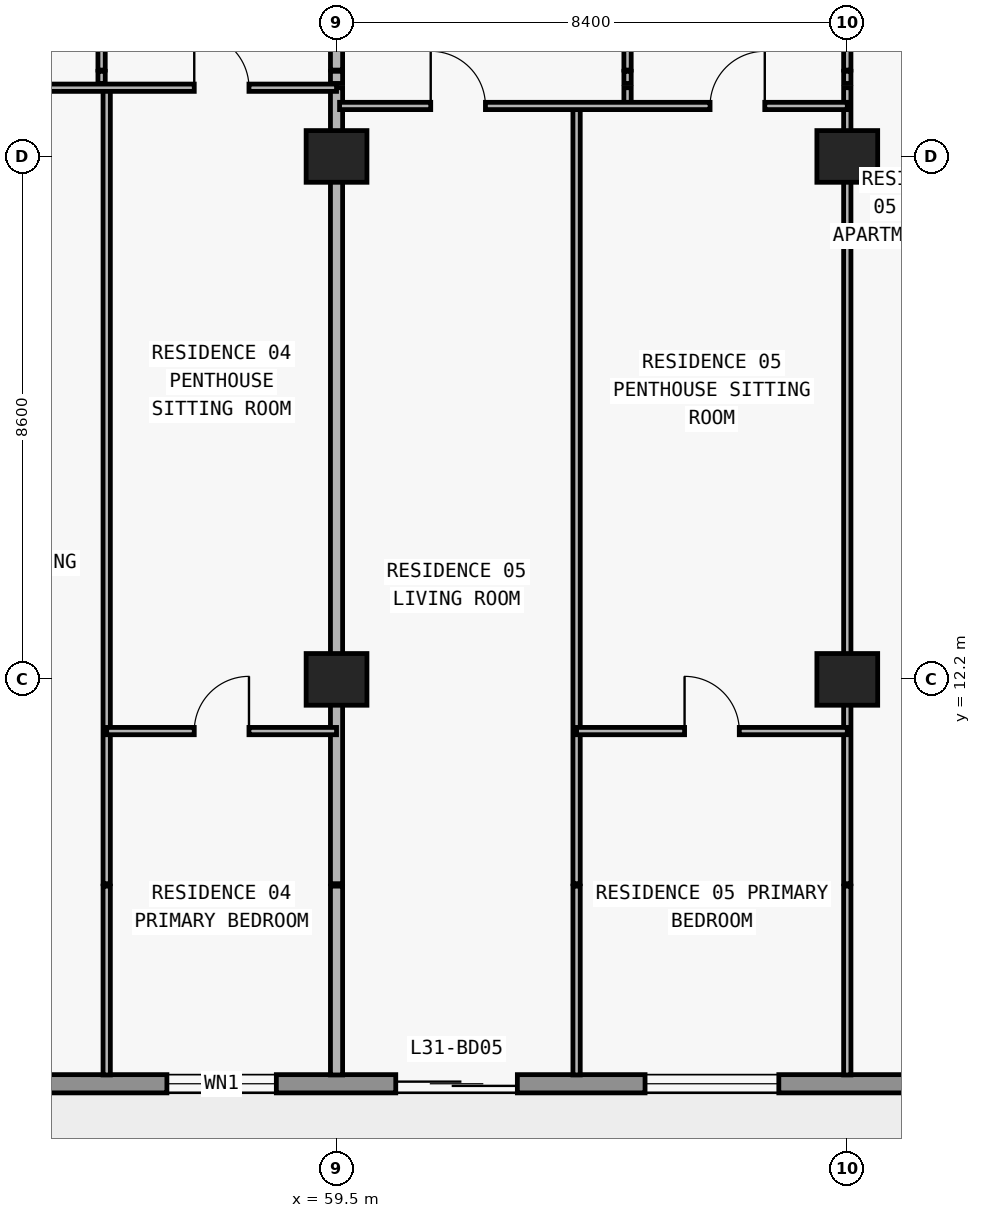
"""IFC4 building model, lengths in metres.
Left out: names, types, materials, properties, quantities, classifications, styles, units other than length and angle.
Written with IfcOpenShell. Run it as: python <this file> out.ifc"""

import sys

from ifc_helpers import new_model, si_unit, direction, frame, frame_2d, origin, origin_2d, place, context, subcontext, project, spatial, rectangle, extrude, element, fill, save


model = new_model("IFC4")
c1 = context("Model", 3, precision=1e-05, world=origin(), true_north=direction((0.0, 1.0)))
c2 = subcontext(c1, "Body", "Model", "MODEL_VIEW")
j1 = project(units=[si_unit("LENGTHUNIT", "METRE"), si_unit("PLANEANGLEUNIT", "RADIAN")], contexts=[c1])
p1 = place(None, origin())
s1 = spatial("IfcSite", under=j1, at=p1, CompositionType="ELEMENT")
p2 = place(p1, origin())
s2 = spatial("IfcBuilding", under=s1, at=p2, CompositionType="ELEMENT")
p3 = place(p2, frame((0.0, 0.0, 115.8)))
s3 = spatial("IfcBuildingStorey", under=s2, at=p3, CompositionType="ELEMENT", Elevation=115.8)
for number, where, z_axis, x_axis in (
    (1, (59.5, 12.2, 0.0), (0.0, 0.0, 1.0), (1.0, 0.0, 0.0)),
    (2, (67.9, 12.2, 0.0), (0.0, 0.0, 1.0), (1.0, 0.0, 0.0)),
    (3, (59.5, 20.8, 0.0), (0.0, 0.0, 1.0), (1.0, 0.0, 0.0)),
    (4, (67.9, 20.8, 0.0), (0.0, 0.0, 1.0), (1.0, 0.0, 0.0)),
):
    element("IfcColumn", number, at=place(p3, frame(where, z_axis=z_axis, x_axis=x_axis)), inside=s3, PredefinedType="COLUMN", context=c2, shape_type="SweptSolid", body=[
        extrude(rectangle(XDim=1.0, YDim=0.85, at=origin_2d()), origin(), (0.0, 0.0, 1.0), 3.05),
    ])
p4 = place(p3, frame((70.1, 5.55, 0.0), z_axis=(0.0, 0.0, 1.0), x_axis=(-1.0, 0.0, 0.0)))
e5 = element("IfcWall", 5, at=p4, inside=s3, PredefinedType="STANDARD", context=c2, shape_type="SweptSolid", body=[
    extrude(rectangle(XDim=62.4, YDim=0.3, at=frame_2d((31.2, 0.0))), origin(), (0.0, 0.0, 1.0), 3.05),
])
p5 = place(p4, frame((57.29, 0.0, 0.0)))
e6 = element("IfcOpeningElement", 6, at=p5, cuts=e5, PredefinedType="OPENING", context=c2, shape_type="SweptSolid", body=[
    extrude(rectangle(XDim=2.0, YDim=2.3, at=frame_2d((1.0, 1.15))), frame((0.0, 0.16, 0.0), z_axis=(0.0, -1.0, 0.0), x_axis=(1.0, 0.0, 0.0)), (0.0, 0.0, 1.0), 0.32),
])
p6 = place(p4, frame((52.61, 0.0, 0.65)))
e7 = element("IfcOpeningElement", 7, at=p6, cuts=e5, PredefinedType="OPENING", context=c2, shape_type="SweptSolid", body=[
    extrude(rectangle(XDim=2.6, YDim=1.85, at=frame_2d((1.3, 0.925))), frame((0.0, 0.16, 0.0), z_axis=(0.0, -1.0, 0.0), x_axis=(1.0, 0.0, 0.0)), (0.0, 0.0, 1.0), 0.32),
])
p7 = place(p4, frame((46.5, 0.0, 0.85)))
e8 = element("IfcOpeningElement", 8, at=p7, cuts=e5, PredefinedType="OPENING", context=c2, shape_type="SweptSolid", body=[
    extrude(rectangle(XDim=2.2, YDim=1.55, at=frame_2d((1.1, 0.775))), frame((0.0, 0.16, 0.0), z_axis=(0.0, -1.0, 0.0), x_axis=(1.0, 0.0, 0.0)), (0.0, 0.0, 1.0), 0.32),
])
p8 = place(p4, frame((40.49, 0.0, 0.0)))
e9 = element("IfcOpeningElement", 9, at=p8, cuts=e5, PredefinedType="OPENING", context=c2, shape_type="SweptSolid", body=[
    extrude(rectangle(XDim=2.0, YDim=2.3, at=frame_2d((1.0, 1.15))), frame((0.0, 0.16, 0.0), z_axis=(0.0, -1.0, 0.0), x_axis=(1.0, 0.0, 0.0)), (0.0, 0.0, 1.0), 0.32),
])
p9 = place(p4, frame((35.81, 0.0, 0.65)))
e10 = element("IfcOpeningElement", 10, at=p9, cuts=e5, PredefinedType="OPENING", context=c2, shape_type="SweptSolid", body=[
    extrude(rectangle(XDim=2.6, YDim=1.85, at=frame_2d((1.3, 0.925))), frame((0.0, 0.16, 0.0), z_axis=(0.0, -1.0, 0.0), x_axis=(1.0, 0.0, 0.0)), (0.0, 0.0, 1.0), 0.32),
])
p10 = place(p4, frame((30.1, 0.0, 0.85)))
e11 = element("IfcOpeningElement", 11, at=p10, cuts=e5, PredefinedType="OPENING", context=c2, shape_type="SweptSolid", body=[
    extrude(rectangle(XDim=2.2, YDim=1.55, at=frame_2d((1.1, 0.775))), frame((0.0, 0.16, 0.0), z_axis=(0.0, -1.0, 0.0), x_axis=(1.0, 0.0, 0.0)), (0.0, 0.0, 1.0), 0.32),
])
p11 = place(p4, frame((24.426, 0.0, 0.0)))
e12 = element("IfcOpeningElement", 12, at=p11, cuts=e5, PredefinedType="OPENING", context=c2, shape_type="SweptSolid", body=[
    extrude(rectangle(XDim=2.0, YDim=2.3, at=frame_2d((1.0, 1.15))), frame((0.0, 0.16, 0.0), z_axis=(0.0, -1.0, 0.0), x_axis=(1.0, 0.0, 0.0)), (0.0, 0.0, 1.0), 0.32),
])
p12 = place(p4, frame((20.126, 0.0, 0.85)))
e13 = element("IfcOpeningElement", 13, at=p12, cuts=e5, PredefinedType="OPENING", context=c2, shape_type="SweptSolid", body=[
    extrude(rectangle(XDim=2.2, YDim=1.55, at=frame_2d((1.1, 0.775))), frame((0.0, 0.16, 0.0), z_axis=(0.0, -1.0, 0.0), x_axis=(1.0, 0.0, 0.0)), (0.0, 0.0, 1.0), 0.32),
])
p13 = place(p4, frame((15.69, 0.0, 0.0)))
e14 = element("IfcOpeningElement", 14, at=p13, cuts=e5, PredefinedType="OPENING", context=c2, shape_type="SweptSolid", body=[
    extrude(rectangle(XDim=2.0, YDim=2.3, at=frame_2d((1.0, 1.15))), frame((0.0, 0.16, 0.0), z_axis=(0.0, -1.0, 0.0), x_axis=(1.0, 0.0, 0.0)), (0.0, 0.0, 1.0), 0.32),
])
p14 = place(p4, frame((11.59, 0.0, 0.85)))
e15 = element("IfcOpeningElement", 15, at=p14, cuts=e5, PredefinedType="OPENING", context=c2, shape_type="SweptSolid", body=[
    extrude(rectangle(XDim=1.8, YDim=1.55, at=frame_2d((0.9, 0.775))), frame((0.0, 0.16, 0.0), z_axis=(0.0, -1.0, 0.0), x_axis=(1.0, 0.0, 0.0)), (0.0, 0.0, 1.0), 0.32),
])
p15 = place(p4, frame((7.626, 0.0, 0.0)))
e16 = element("IfcOpeningElement", 16, at=p15, cuts=e5, PredefinedType="OPENING", context=c2, shape_type="SweptSolid", body=[
    extrude(rectangle(XDim=2.0, YDim=2.3, at=frame_2d((1.0, 1.15))), frame((0.0, 0.16, 0.0), z_axis=(0.0, -1.0, 0.0), x_axis=(1.0, 0.0, 0.0)), (0.0, 0.0, 1.0), 0.32),
])
p16 = place(p4, frame((3.326, 0.0, 0.85)))
e17 = element("IfcOpeningElement", 17, at=p16, cuts=e5, PredefinedType="OPENING", context=c2, shape_type="SweptSolid", body=[
    extrude(rectangle(XDim=2.2, YDim=1.55, at=frame_2d((1.1, 0.775))), frame((0.0, 0.16, 0.0), z_axis=(0.0, -1.0, 0.0), x_axis=(1.0, 0.0, 0.0)), (0.0, 0.0, 1.0), 0.32),
])
p17 = place(p3, frame((55.636, 22.0, 0.0), z_axis=(0.0, 0.0, 1.0), x_axis=(0.0, 1.0, 0.0)))
e18 = element("IfcWall", 18, at=p17, inside=s3, PredefinedType="PARTITIONING", context=c2, shape_type="SweptSolid", body=[
    extrude(rectangle(XDim=0.2, YDim=0.12, at=frame_2d((0.1, 0.0))), origin(), (0.0, 0.0, 1.0), 3.05),
])
p18 = place(p3, frame((55.636, 22.22, 0.0), z_axis=(0.0, 0.0, 1.0), x_axis=(0.0, 1.0, 0.0)))
e19 = element("IfcWall", 19, at=p18, inside=s3, PredefinedType="PARTITIONING", context=c2, shape_type="SweptSolid", body=[
    extrude(rectangle(XDim=4.38, YDim=0.12, at=frame_2d((2.19, 0.0))), origin(), (0.0, 0.0, 1.0), 3.05),
])
p19 = place(p18, frame((1.74, 0.0, 0.0)))
e20 = element("IfcOpeningElement", 20, at=p19, cuts=e19, PredefinedType="OPENING", context=c2, shape_type="SweptSolid", body=[
    extrude(rectangle(XDim=0.9, YDim=2.15, at=frame_2d((0.45, 1.075))), frame((0.0, 0.07, 0.0), z_axis=(0.0, -1.0, 0.0), x_axis=(1.0, 0.0, 0.0)), (0.0, 0.0, 1.0), 0.14),
])
p20 = place(p3, frame((55.72, 5.695, 0.0), z_axis=(0.0, 0.0, 1.0), x_axis=(0.0, 1.0, 0.0)))
e21 = element("IfcWall", 21, at=p20, inside=s3, PredefinedType="PARTITIONING", context=c2, shape_type="SweptSolid", body=[
    extrude(rectangle(XDim=3.105, YDim=0.12, at=frame_2d((1.552, 0.0))), origin(), (0.0, 0.0, 1.0), 3.05),
])
p21 = place(p3, frame((55.72, 8.84, 0.0), z_axis=(0.0, 0.0, 1.0), x_axis=(0.0, 1.0, 0.0)))
e22 = element("IfcWall", 22, at=p21, inside=s3, PredefinedType="PARTITIONING", context=c2, shape_type="SweptSolid", body=[
    extrude(rectangle(XDim=13.09, YDim=0.12, at=frame_2d((6.545, 0.0))), origin(), (0.0, 0.0, 1.0), 3.05),
])
p22 = place(p3, frame((59.5, 5.695, 0.0), z_axis=(0.0, 0.0, 1.0), x_axis=(0.0, 1.0, 0.0)))
e23 = element("IfcWall", 23, at=p22, inside=s3, PredefinedType="PARTITIONING", context=c2, shape_type="SweptSolid", body=[
    extrude(rectangle(XDim=3.105, YDim=0.2, at=frame_2d((1.552, 0.0))), origin(), (0.0, 0.0, 1.0), 3.05),
])
p23 = place(p3, frame((59.5, 8.84, 0.0), z_axis=(0.0, 0.0, 1.0), x_axis=(0.0, 1.0, 0.0)))
e24 = element("IfcWall", 24, at=p23, inside=s3, PredefinedType="PARTITIONING", context=c2, shape_type="SweptSolid", body=[
    extrude(rectangle(XDim=13.09, YDim=0.2, at=frame_2d((6.545, 0.0))), origin(), (0.0, 0.0, 1.0), 2.174),
])
p24 = place(p3, frame((59.5, 22.0, 0.0), z_axis=(0.0, 0.0, 1.0), x_axis=(0.0, 1.0, 0.0)))
e25 = element("IfcWall", 25, at=p24, inside=s3, PredefinedType="PARTITIONING", context=c2, shape_type="SweptSolid", body=[
    extrude(rectangle(XDim=0.2, YDim=0.2, at=frame_2d((0.1, 0.0))), origin(), (0.0, 0.0, 1.0), 2.174),
])
p25 = place(p3, frame((59.5, 22.22, 0.0), z_axis=(0.0, 0.0, 1.0), x_axis=(0.0, 1.0, 0.0)))
e26 = element("IfcWall", 26, at=p25, inside=s3, PredefinedType="PARTITIONING", context=c2, shape_type="SweptSolid", body=[
    extrude(rectangle(XDim=4.38, YDim=0.2, at=frame_2d((2.19, 0.0))), origin(), (0.0, 0.0, 1.0), 2.174),
])
p26 = place(p3, frame((63.448, 5.695, 0.0), z_axis=(0.0, 0.0, 1.0), x_axis=(0.0, 1.0, 0.0)))
e27 = element("IfcWall", 27, at=p26, inside=s3, PredefinedType="PARTITIONING", context=c2, shape_type="SweptSolid", body=[
    extrude(rectangle(XDim=3.105, YDim=0.12, at=frame_2d((1.552, 0.0))), origin(), (0.0, 0.0, 1.0), 3.05),
])
p27 = place(p3, frame((63.448, 8.84, 0.0), z_axis=(0.0, 0.0, 1.0), x_axis=(0.0, 1.0, 0.0)))
e28 = element("IfcWall", 28, at=p27, inside=s3, PredefinedType="PARTITIONING", context=c2, shape_type="SweptSolid", body=[
    extrude(rectangle(XDim=12.79, YDim=0.12, at=frame_2d((6.395, 0.0))), origin(), (0.0, 0.0, 1.0), 3.05),
])
p28 = place(p3, frame((64.286, 21.63, 0.0), z_axis=(0.0, 0.0, 1.0), x_axis=(0.0, 1.0, 0.0)))
e29 = element("IfcWall", 29, at=p28, inside=s3, PredefinedType="PARTITIONING", context=c2, shape_type="SweptSolid", body=[
    extrude(rectangle(XDim=0.3, YDim=0.12, at=frame_2d((0.15, 0.0))), origin(), (0.0, 0.0, 1.0), 3.05),
])
p29 = place(p3, frame((64.286, 22.0, 0.0), z_axis=(0.0, 0.0, 1.0), x_axis=(0.0, 1.0, 0.0)))
e30 = element("IfcWall", 30, at=p29, inside=s3, PredefinedType="PARTITIONING", context=c2, shape_type="SweptSolid", body=[
    extrude(rectangle(XDim=0.2, YDim=0.12, at=frame_2d((0.1, 0.0))), origin(), (0.0, 0.0, 1.0), 3.05),
])
p30 = place(p3, frame((64.286, 22.22, 0.0), z_axis=(0.0, 0.0, 1.0), x_axis=(0.0, 1.0, 0.0)))
e31 = element("IfcWall", 31, at=p30, inside=s3, PredefinedType="PARTITIONING", context=c2, shape_type="SweptSolid", body=[
    extrude(rectangle(XDim=4.38, YDim=0.12, at=frame_2d((2.19, 0.0))), origin(), (0.0, 0.0, 1.0), 3.05),
])
p31 = place(p30, frame((1.74, 0.0, 0.0)))
e32 = element("IfcOpeningElement", 32, at=p31, cuts=e31, PredefinedType="OPENING", context=c2, shape_type="SweptSolid", body=[
    extrude(rectangle(XDim=0.9, YDim=2.15, at=frame_2d((0.45, 1.075))), frame((0.0, 0.07, 0.0), z_axis=(0.0, -1.0, 0.0), x_axis=(1.0, 0.0, 0.0)), (0.0, 0.0, 1.0), 0.14),
])
p32 = place(p3, frame((67.9, 5.695, 0.0), z_axis=(0.0, 0.0, 1.0), x_axis=(0.0, 1.0, 0.0)))
e33 = element("IfcWall", 33, at=p32, inside=s3, PredefinedType="PARTITIONING", context=c2, shape_type="SweptSolid", body=[
    extrude(rectangle(XDim=3.105, YDim=0.12, at=frame_2d((1.552, 0.0))), origin(), (0.0, 0.0, 1.0), 3.05),
])
p33 = place(p3, frame((67.9, 8.84, 0.0), z_axis=(0.0, 0.0, 1.0), x_axis=(0.0, 1.0, 0.0)))
e34 = element("IfcWall", 34, at=p33, inside=s3, PredefinedType="PARTITIONING", context=c2, shape_type="SweptSolid", body=[
    extrude(rectangle(XDim=13.09, YDim=0.12, at=frame_2d((6.545, 0.0))), origin(), (0.0, 0.0, 1.0), 2.174),
])
p34 = place(p3, frame((67.9, 22.0, 0.0), z_axis=(0.0, 0.0, 1.0), x_axis=(0.0, 1.0, 0.0)))
e35 = element("IfcWall", 35, at=p34, inside=s3, PredefinedType="PARTITIONING", context=c2, shape_type="SweptSolid", body=[
    extrude(rectangle(XDim=0.2, YDim=0.12, at=frame_2d((0.1, 0.0))), origin(), (0.0, 0.0, 1.0), 2.174),
])
p35 = place(p3, frame((67.9, 22.22, 0.0), z_axis=(0.0, 0.0, 1.0), x_axis=(0.0, 1.0, 0.0)))
e36 = element("IfcWall", 36, at=p35, inside=s3, PredefinedType="PARTITIONING", context=c2, shape_type="SweptSolid", body=[
    extrude(rectangle(XDim=4.38, YDim=0.12, at=frame_2d((2.19, 0.0))), origin(), (0.0, 0.0, 1.0), 2.174),
])
p36 = place(p35, frame((1.74, 0.0, 0.0)))
e37 = element("IfcOpeningElement", 37, at=p36, cuts=e36, PredefinedType="OPENING", context=c2, shape_type="SweptSolid", body=[
    extrude(rectangle(XDim=0.9, YDim=2.124, at=frame_2d((0.45, 1.062))), frame((0.0, 0.07, 0.0), z_axis=(0.0, -1.0, 0.0), x_axis=(1.0, 0.0, 0.0)), (0.0, 0.0, 1.0), 0.14),
])
p37 = place(p3, frame((55.72, 11.35, 0.0), z_axis=(0.0, 0.0, 1.0), x_axis=(1.0, 0.0, 0.0)))
e38 = element("IfcWall", 38, at=p37, inside=s3, PredefinedType="PARTITIONING", context=c2, shape_type="SweptSolid", body=[
    extrude(rectangle(XDim=3.78, YDim=0.12, at=frame_2d((1.89, 0.0))), origin(), (0.0, 0.0, 1.0), 3.05),
])
p38 = place(p37, frame((1.44, 0.0, 0.0)))
e39 = element("IfcOpeningElement", 39, at=p38, cuts=e38, PredefinedType="OPENING", context=c2, shape_type="SweptSolid", body=[
    extrude(rectangle(XDim=0.9, YDim=2.15, at=frame_2d((0.45, 1.075))), frame((0.0, 0.07, 0.0), z_axis=(0.0, -1.0, 0.0), x_axis=(1.0, 0.0, 0.0)), (0.0, 0.0, 1.0), 0.14),
])
p39 = place(p3, frame((63.448, 11.35, 0.0), z_axis=(0.0, 0.0, 1.0), x_axis=(1.0, 0.0, 0.0)))
e40 = element("IfcWall", 40, at=p39, inside=s3, PredefinedType="PARTITIONING", context=c2, shape_type="SweptSolid", body=[
    extrude(rectangle(XDim=4.452, YDim=0.12, at=frame_2d((2.226, 0.0))), origin(), (0.0, 0.0, 1.0), 3.05),
])
p40 = place(p39, frame((1.776, 0.0, 0.0)))
e41 = element("IfcOpeningElement", 41, at=p40, cuts=e40, PredefinedType="OPENING", context=c2, shape_type="SweptSolid", body=[
    extrude(rectangle(XDim=0.9, YDim=2.15, at=frame_2d((0.45, 1.075))), frame((0.0, 0.07, 0.0), z_axis=(0.0, -1.0, 0.0), x_axis=(1.0, 0.0, 0.0)), (0.0, 0.0, 1.0), 0.14),
])
p41 = place(p3, frame((59.55, 21.63, 0.0), z_axis=(0.0, 0.0, 1.0), x_axis=(1.0, 0.0, 0.0)))
e42 = element("IfcWall", 42, at=p41, inside=s3, PredefinedType="PARTITIONING", context=c2, shape_type="SweptSolid", body=[
    extrude(rectangle(XDim=8.35, YDim=0.12, at=frame_2d((4.175, 0.0))), origin(), (0.0, 0.0, 1.0), 3.05),
])
p42 = place(p41, frame((1.499, 0.0, 0.0)))
e43 = element("IfcOpeningElement", 43, at=p42, cuts=e42, PredefinedType="OPENING", context=c2, shape_type="SweptSolid", body=[
    extrude(rectangle(XDim=0.9, YDim=2.15, at=frame_2d((0.45, 1.075))), frame((0.0, 0.07, 0.0), z_axis=(0.0, -1.0, 0.0), x_axis=(1.0, 0.0, 0.0)), (0.0, 0.0, 1.0), 0.14),
])
p43 = place(p41, frame((6.093, 0.0, 0.0)))
e44 = element("IfcOpeningElement", 44, at=p43, cuts=e42, PredefinedType="OPENING", context=c2, shape_type="SweptSolid", body=[
    extrude(rectangle(XDim=0.9, YDim=2.15, at=frame_2d((0.45, 1.075))), frame((0.0, 0.07, 0.0), z_axis=(0.0, -1.0, 0.0), x_axis=(1.0, 0.0, 0.0)), (0.0, 0.0, 1.0), 0.14),
])
p44 = place(p3, frame((51.32, 21.93, 0.0), z_axis=(0.0, 0.0, 1.0), x_axis=(1.0, 0.0, 0.0)))
e45 = element("IfcWall", 45, at=p44, inside=s3, PredefinedType="PARTITIONING", context=c2, shape_type="SweptSolid", body=[
    extrude(rectangle(XDim=8.18, YDim=0.12, at=frame_2d((4.09, 0.0))), origin(), (0.0, 0.0, 1.0), 3.05),
])
p45 = place(p44, frame((1.708, 0.0, 0.0)))
e46 = element("IfcOpeningElement", 46, at=p45, cuts=e45, PredefinedType="OPENING", context=c2, shape_type="SweptSolid", body=[
    extrude(rectangle(XDim=0.9, YDim=2.15, at=frame_2d((0.45, 1.075))), frame((0.0, 0.07, 0.0), z_axis=(0.0, -1.0, 0.0), x_axis=(1.0, 0.0, 0.0)), (0.0, 0.0, 1.0), 0.14),
])
p46 = place(p44, frame((5.84, 0.0, 0.0)))
e47 = element("IfcOpeningElement", 47, at=p46, cuts=e45, PredefinedType="OPENING", context=c2, shape_type="SweptSolid", body=[
    extrude(rectangle(XDim=0.9, YDim=2.15, at=frame_2d((0.45, 1.075))), frame((0.0, 0.07, 0.0), z_axis=(0.0, -1.0, 0.0), x_axis=(1.0, 0.0, 0.0)), (0.0, 0.0, 1.0), 0.14),
])
p47 = place(p14, origin())
e48 = element("IfcWindow", 48, at=p47, inside=s3, PartitioningType="SINGLE_PANEL", PredefinedType="WINDOW", context=c2, shape_type="SweptSolid", body=[
    extrude(rectangle(XDim=1.8, YDim=1.55, at=frame_2d((0.9, 0.775))), frame((0.0, 0.03, 0.0), z_axis=(0.0, -1.0, 0.0), x_axis=(1.0, 0.0, 0.0)), (0.0, 0.0, 1.0), 0.06),
])
fill(e15, e48)
p48 = place(p15, origin())
e49 = element("IfcDoor", 49, at=p48, inside=s3, OperationType="DOUBLE_DOOR_SLIDING", PredefinedType="DOOR", context=c2, shape_type="SweptSolid", body=[
    extrude(rectangle(XDim=2.0, YDim=2.3, at=frame_2d((1.0, 1.15))), frame((0.0, 0.025, 0.0), z_axis=(0.0, -1.0, 0.0), x_axis=(1.0, 0.0, 0.0)), (0.0, 0.0, 1.0), 0.05),
])
fill(e16, e49)
p49 = place(p16, origin())
e50 = element("IfcWindow", 50, at=p49, inside=s3, PartitioningType="SINGLE_PANEL", PredefinedType="WINDOW", context=c2, shape_type="SweptSolid", body=[
    extrude(rectangle(XDim=2.2, YDim=1.55, at=frame_2d((1.1, 0.775))), frame((0.0, 0.03, 0.0), z_axis=(0.0, -1.0, 0.0), x_axis=(1.0, 0.0, 0.0)), (0.0, 0.0, 1.0), 0.06),
])
fill(e17, e50)
p50 = place(p46, origin())
e51 = element("IfcDoor", 51, at=p50, inside=s3, OperationType="SINGLE_SWING_LEFT", PredefinedType="DOOR", context=c2, shape_type="SweptSolid", body=[
    extrude(rectangle(XDim=0.9, YDim=2.15, at=frame_2d((0.45, 1.075))), frame((0.0, 0.025, 0.0), z_axis=(0.0, -1.0, 0.0), x_axis=(1.0, 0.0, 0.0)), (0.0, 0.0, 1.0), 0.05),
])
fill(e47, e51)
p51 = place(p38, origin())
e52 = element("IfcDoor", 52, at=p51, inside=s3, OperationType="SINGLE_SWING_RIGHT", PredefinedType="DOOR", context=c2, shape_type="SweptSolid", body=[
    extrude(rectangle(XDim=0.9, YDim=2.15, at=frame_2d((0.45, 1.075))), frame((0.0, 0.025, 0.0), z_axis=(0.0, -1.0, 0.0), x_axis=(1.0, 0.0, 0.0)), (0.0, 0.0, 1.0), 0.05),
])
fill(e39, e52)
p52 = place(p42, origin())
e53 = element("IfcDoor", 53, at=p52, inside=s3, OperationType="SINGLE_SWING_LEFT", PredefinedType="DOOR", context=c2, shape_type="SweptSolid", body=[
    extrude(rectangle(XDim=0.9, YDim=2.15, at=frame_2d((0.45, 1.075))), frame((0.0, 0.025, 0.0), z_axis=(0.0, -1.0, 0.0), x_axis=(1.0, 0.0, 0.0)), (0.0, 0.0, 1.0), 0.05),
])
fill(e43, e53)
p53 = place(p43, origin())
e54 = element("IfcDoor", 54, at=p53, inside=s3, OperationType="SINGLE_SWING_RIGHT", PredefinedType="DOOR", context=c2, shape_type="SweptSolid", body=[
    extrude(rectangle(XDim=0.9, YDim=2.15, at=frame_2d((0.45, 1.075))), frame((0.0, 0.025, 0.0), z_axis=(0.0, -1.0, 0.0), x_axis=(1.0, 0.0, 0.0)), (0.0, 0.0, 1.0), 0.05),
])
fill(e44, e54)
p54 = place(p40, origin())
e55 = element("IfcDoor", 55, at=p54, inside=s3, OperationType="SINGLE_SWING_LEFT", PredefinedType="DOOR", context=c2, shape_type="SweptSolid", body=[
    extrude(rectangle(XDim=0.9, YDim=2.15, at=frame_2d((0.45, 1.075))), frame((0.0, 0.025, 0.0), z_axis=(0.0, -1.0, 0.0), x_axis=(1.0, 0.0, 0.0)), (0.0, 0.0, 1.0), 0.05),
])
fill(e41, e55)
save(model, sys.argv[1])
